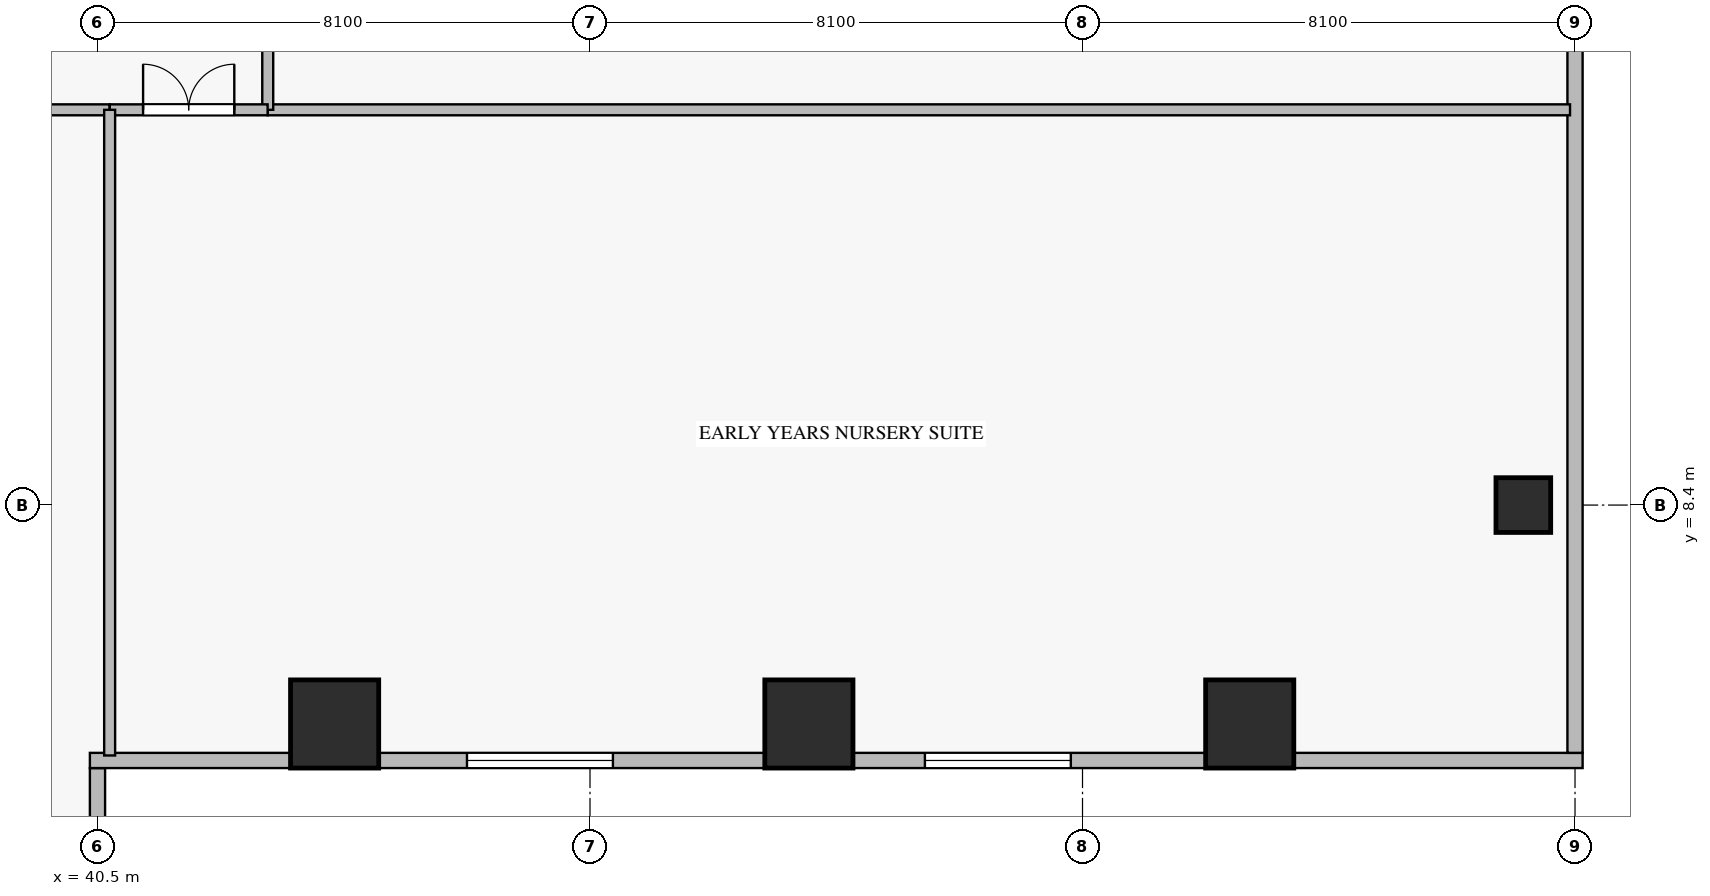
"""IFC4 building model, lengths in metres.
Left out: names, types, materials, properties, quantities, classifications, styles, units other than length and angle.
Written with IfcOpenShell. Run it as: python <this file> out.ifc"""

import sys

from ifc_helpers import new_model, si_unit, direction, frame, frame_2d, origin, origin_2d, place, context, subcontext, project, spatial, rectangle, extrude, source, transform, mapped, element, fill, save


model = new_model("IFC4")
c1 = context("Model", 3, precision=1e-05, world=origin(), true_north=direction((0.0, 1.0)))
c2 = subcontext(c1, "Body", "Model", "MODEL_VIEW")
j1 = project(units=[si_unit("LENGTHUNIT", "METRE"), si_unit("PLANEANGLEUNIT", "RADIAN")], contexts=[c1])
p1 = place(None, origin())
s1 = spatial("IfcSite", under=j1, at=p1, CompositionType="ELEMENT")
p2 = place(p1, origin())
s2 = spatial("IfcBuilding", under=s1, at=p2, CompositionType="ELEMENT")
p3 = place(p2, frame((0.0, 0.0, 10.5)))
s3 = spatial("IfcBuildingStorey", under=s2, at=p3, CompositionType="ELEMENT", Elevation=10.5)
m1 = source(origin(), c2, "Body", "SweptSolid", [
    extrude(rectangle(XDim=0.9, YDim=0.9, at=origin_2d()), origin(), (0.0, 0.0, 1.0), 4.8),
])
p4 = place(p3, frame((63.95, 8.4, -0.38), z_axis=(0.0, 0.0, 1.0), x_axis=(1.0, 0.0, 0.0)))
e1 = element("IfcColumn", 1, at=p4, inside=s3, PredefinedType="COLUMN", context=c2, shape_type="MappedRepresentation", body=[
    mapped(m1, transform((0.0, 0.0, 0.0), scale=1.0)),
])
m2 = source(origin(), c2, "Body", "SweptSolid", [
    extrude(rectangle(XDim=1.45, YDim=1.45, at=origin_2d()), origin(), (0.0, 0.0, 1.0), 4.8),
])
for number, where, z_axis, x_axis in (
    (2, (44.4, 4.8, -0.38), (0.0, 0.0, 1.0), (1.0, 0.0, 0.0)),
    (3, (52.2, 4.8, -0.38), (0.0, 0.0, 1.0), (1.0, 0.0, 0.0)),
    (4, (59.45, 4.8, -0.38), (0.0, 0.0, 1.0), (1.0, 0.0, 0.0)),
):
    element("IfcColumn", number, at=place(p3, frame(where, z_axis=z_axis, x_axis=x_axis)), inside=s3, PredefinedType="COLUMN", context=c2, shape_type="MappedRepresentation", body=[
        mapped(m2, transform((0.0, 0.0, 0.0), scale=1.0)),
    ])
p5 = place(p3, frame((40.5, 2.4, 0.0), z_axis=(0.0, 0.0, 1.0), x_axis=(0.0, 1.0, 0.0)))
e5 = element("IfcWall", 5, at=p5, inside=s3, PredefinedType="ELEMENTEDWALL", context=c2, shape_type="SweptSolid", body=[
    extrude(rectangle(XDim=1.675, YDim=0.25, at=frame_2d((0.837, 0.0))), origin(), (0.0, 0.0, 1.0), 4.405),
])
p6 = place(p3, frame((40.375, 4.2, 0.0), z_axis=(0.0, 0.0, 1.0), x_axis=(1.0, 0.0, 0.0)))
e6 = element("IfcWall", 6, at=p6, inside=s3, PredefinedType="ELEMENTEDWALL", context=c2, shape_type="SweptSolid", body=[
    extrude(rectangle(XDim=24.55, YDim=0.25, at=frame_2d((12.275, 0.0))), origin(), (0.0, 0.0, 1.0), 4.405),
])
p7 = place(p6, frame((6.202, 0.0, 0.6)))
e7 = element("IfcOpeningElement", 7, at=p7, cuts=e6, PredefinedType="OPENING", context=c2, shape_type="SweptSolid", body=[
    extrude(rectangle(XDim=2.4, YDim=2.6, at=frame_2d((1.2, 1.3))), frame((0.0, 0.135, 0.0), z_axis=(0.0, -1.0, 0.0), x_axis=(1.0, 0.0, 0.0)), (0.0, 0.0, 1.0), 0.27),
])
p8 = place(p6, frame((13.733, 0.0, 0.6)))
e8 = element("IfcOpeningElement", 8, at=p8, cuts=e6, PredefinedType="OPENING", context=c2, shape_type="SweptSolid", body=[
    extrude(rectangle(XDim=2.4, YDim=2.6, at=frame_2d((1.2, 1.3))), frame((0.0, 0.135, 0.0), z_axis=(0.0, -1.0, 0.0), x_axis=(1.0, 0.0, 0.0)), (0.0, 0.0, 1.0), 0.27),
])
p9 = place(p3, frame((64.8, 4.325, 0.0), z_axis=(0.0, 0.0, 1.0), x_axis=(0.0, 1.0, 0.0)))
e9 = element("IfcWall", 9, at=p9, inside=s3, PredefinedType="ELEMENTEDWALL", context=c2, shape_type="SweptSolid", body=[
    extrude(rectangle(XDim=41.75, YDim=0.25, at=frame_2d((20.875, 0.0))), origin(), (0.0, 0.0, 1.0), 4.405),
])
p10 = place(p9, frame((14.953, 0.0, 0.6)))
e10 = element("IfcOpeningElement", 10, at=p10, cuts=e9, PredefinedType="OPENING", context=c2, shape_type="SweptSolid", body=[
    extrude(rectangle(XDim=2.4, YDim=2.6, at=frame_2d((1.2, 1.3))), frame((0.0, 0.135, 0.0), z_axis=(0.0, -1.0, 0.0), x_axis=(1.0, 0.0, 0.0)), (0.0, 0.0, 1.0), 0.27),
])
p11 = place(p9, frame((24.397, 0.0, 0.6)))
e11 = element("IfcOpeningElement", 11, at=p11, cuts=e9, PredefinedType="OPENING", context=c2, shape_type="SweptSolid", body=[
    extrude(rectangle(XDim=2.4, YDim=2.6, at=frame_2d((1.2, 1.3))), frame((0.0, 0.135, 0.0), z_axis=(0.0, -1.0, 0.0), x_axis=(1.0, 0.0, 0.0)), (0.0, 0.0, 1.0), 0.27),
])
p12 = place(p3, frame((43.3, 14.9, 0.0), z_axis=(0.0, 0.0, 1.0), x_axis=(1.0, 0.0, 0.0)))
e12 = element("IfcWall", 12, at=p12, inside=s3, PredefinedType="PARTITIONING", context=c2, shape_type="SweptSolid", body=[
    extrude(rectangle(XDim=21.418, YDim=0.18, at=frame_2d((10.709, 0.0))), origin(), (0.0, 0.0, 1.0), 4.42),
])
p13 = place(p3, frame((43.3, 14.9, 0.0), z_axis=(0.0, 0.0, 1.0), x_axis=(0.0, 1.0, 0.0)))
e13 = element("IfcWall", 13, at=p13, inside=s3, PredefinedType="PARTITIONING", context=c2, shape_type="SweptSolid", body=[
    extrude(rectangle(XDim=18.18, YDim=0.18, at=frame_2d((9.09, 0.0))), origin(), (0.0, 0.0, 1.0), 4.42),
])
p14 = place(p13, frame((8.34, 0.0, 0.0)))
e14 = element("IfcOpeningElement", 14, at=p14, cuts=e13, PredefinedType="OPENING", context=c2, shape_type="SweptSolid", body=[
    extrude(rectangle(XDim=1.5, YDim=2.25, at=frame_2d((0.75, 1.125))), frame((0.0, 0.1, 0.0), z_axis=(0.0, -1.0, 0.0), x_axis=(1.0, 0.0, 0.0)), (0.0, 0.0, 1.0), 0.2),
])
p15 = place(p3, frame((30.802, 14.9, 0.0), z_axis=(0.0, 0.0, 1.0), x_axis=(1.0, 0.0, 0.0)))
e15 = element("IfcWall", 15, at=p15, inside=s3, PredefinedType="PARTITIONING", context=c2, shape_type="SweptSolid", body=[
    extrude(rectangle(XDim=9.898, YDim=0.18, at=frame_2d((4.949, 0.0))), origin(), (0.0, 0.0, 1.0), 4.42),
])
p16 = place(p15, frame((4.149, 0.0, 0.0)))
e16 = element("IfcOpeningElement", 16, at=p16, cuts=e15, PredefinedType="OPENING", context=c2, shape_type="SweptSolid", body=[
    extrude(rectangle(XDim=1.6, YDim=2.3, at=frame_2d((0.8, 1.15))), frame((0.0, 0.1, 0.0), z_axis=(0.0, -1.0, 0.0), x_axis=(1.0, 0.0, 0.0)), (0.0, 0.0, 1.0), 0.2),
])
p17 = place(p3, frame((40.702, 14.9, 0.0), z_axis=(0.0, 0.0, 1.0), x_axis=(1.0, 0.0, 0.0)))
e17 = element("IfcWall", 17, at=p17, inside=s3, PredefinedType="PARTITIONING", context=c2, shape_type="SweptSolid", body=[
    extrude(rectangle(XDim=2.596, YDim=0.18, at=frame_2d((1.298, 0.0))), origin(), (0.0, 0.0, 1.0), 4.42),
])
p18 = place(p17, frame((0.548, 0.0, 0.0)))
e18 = element("IfcOpeningElement", 18, at=p18, cuts=e17, PredefinedType="OPENING", context=c2, shape_type="SweptSolid", body=[
    extrude(rectangle(XDim=1.5, YDim=2.25, at=frame_2d((0.75, 1.125))), frame((0.0, 0.1, 0.0), z_axis=(0.0, -1.0, 0.0), x_axis=(1.0, 0.0, 0.0)), (0.0, 0.0, 1.0), 0.2),
])
p19 = place(p3, frame((40.7, 4.282, 0.0), z_axis=(0.0, 0.0, 1.0), x_axis=(0.0, 1.0, 0.0)))
e19 = element("IfcWall", 19, at=p19, inside=s3, PredefinedType="PARTITIONING", context=c2, shape_type="SweptSolid", body=[
    extrude(rectangle(XDim=10.618, YDim=0.18, at=frame_2d((5.309, 0.0))), origin(), (0.0, 0.0, 1.0), 4.42),
])
m3 = source(origin(), c2, "Body", "SweptSolid", [
    extrude(rectangle(XDim=2.4, YDim=2.6, at=frame_2d((1.2, 1.3))), frame((0.0, 0.03, 0.0), z_axis=(0.0, -1.0, 0.0), x_axis=(1.0, 0.0, 0.0)), (0.0, 0.0, 1.0), 0.06),
])
p20 = place(p7, origin())
e20 = element("IfcWindow", 20, at=p20, inside=s3, PartitioningType="SINGLE_PANEL", PredefinedType="WINDOW", context=c2, shape_type="MappedRepresentation", body=[
    mapped(m3, transform((0.0, 0.0, 0.0), scale=1.0)),
])
fill(e7, e20)
p21 = place(p8, origin())
e21 = element("IfcWindow", 21, at=p21, inside=s3, PartitioningType="SINGLE_PANEL", PredefinedType="WINDOW", context=c2, shape_type="MappedRepresentation", body=[
    mapped(m3, transform((0.0, 0.0, 0.0), scale=1.0)),
])
fill(e8, e21)
m4 = source(origin(), c2, "Body", "SweptSolid", [
    extrude(rectangle(XDim=1.5, YDim=2.25, at=frame_2d((0.75, 1.125))), frame((0.0, 0.025, 0.0), z_axis=(0.0, -1.0, 0.0), x_axis=(1.0, 0.0, 0.0)), (0.0, 0.0, 1.0), 0.05),
])
p22 = place(p18, origin())
e22 = element("IfcDoor", 22, at=p22, inside=s3, OperationType="DOUBLE_DOOR_SINGLE_SWING", PredefinedType="DOOR", context=c2, shape_type="MappedRepresentation", body=[
    mapped(m4, transform((0.0, 0.0, 0.0), scale=1.0)),
])
fill(e18, e22)
save(model, sys.argv[1])
